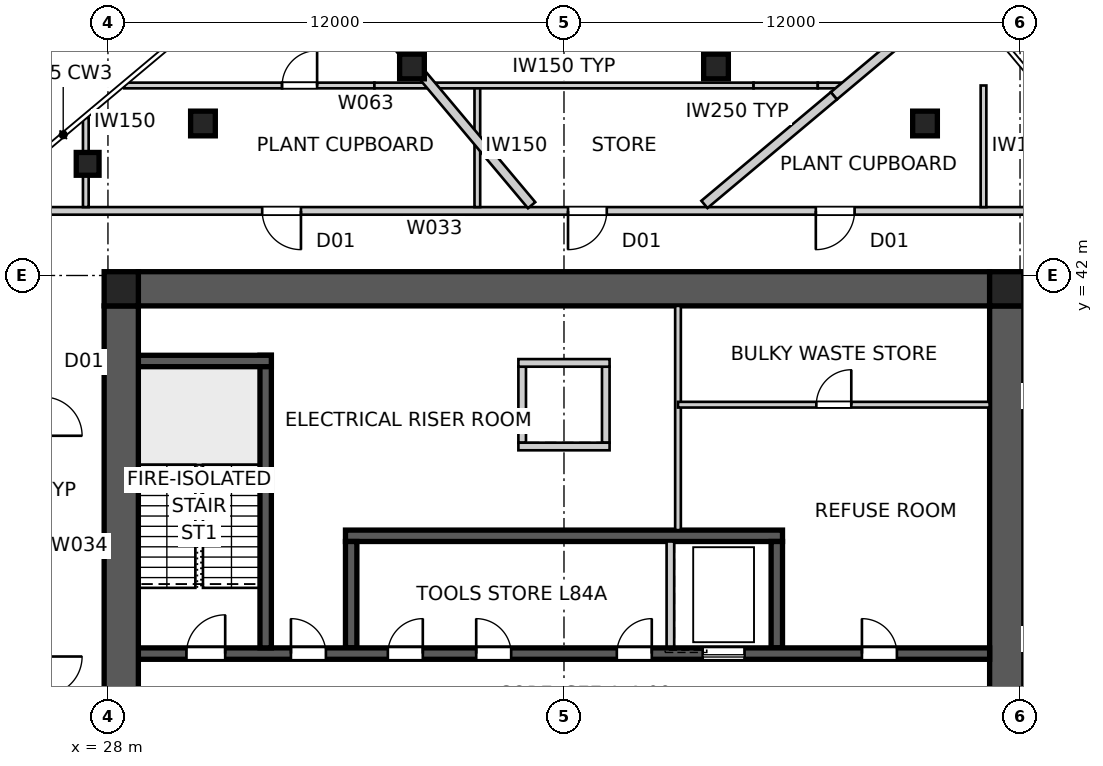
"""IFC4 building model, lengths in metres.
Left out: names, types, materials, properties, quantities, classifications, styles, units other than length and angle.
Written with IfcOpenShell. Run it as: python <this file> out.ifc"""

import sys

from ifc_helpers import new_model, si_unit, direction, frame, frame_2d, origin, origin_2d, place, context, subcontext, project, spatial, polyline, rectangle, outline, extrude, element, fill, save


model = new_model("IFC4")
c1 = context("Model", 3, precision=1e-05, world=origin(), true_north=direction((0.0, 1.0)))
c2 = subcontext(c1, "Body", "Model", "MODEL_VIEW")
j1 = project(units=[si_unit("LENGTHUNIT", "METRE"), si_unit("PLANEANGLEUNIT", "RADIAN")], contexts=[c1])
p1 = place(None, origin())
s1 = spatial("IfcSite", under=j1, at=p1, CompositionType="ELEMENT")
p2 = place(p1, origin())
s2 = spatial("IfcBuilding", under=s1, at=p2, CompositionType="ELEMENT")
p3 = place(p2, frame((0.0, 0.0, 304.3)))
s3 = spatial("IfcBuildingStorey", under=s2, at=p3, CompositionType="ELEMENT", Elevation=304.3)
p4 = place(p3, frame((28.8, 41.65, 0.0), z_axis=(0.0, 0.0, 1.0), x_axis=(1.0, 0.0, 0.0)))
e1 = element("IfcWall", 1, at=p4, inside=s3, PredefinedType="SHEAR", context=c2, shape_type="SweptSolid", body=[
    extrude(outline(polyline([(0.0, -0.45), (22.4, -0.45), (22.4, -0.025), (22.85, -0.025), (22.85, 0.025), (22.4, 0.025), (22.4, 0.45), (0.0, 0.45), (0.0, 0.025), (-0.45, 0.025), (-0.45, -0.025), (0.0, -0.025), (0.0, -0.45)])), origin(), (0.0, 0.0, 1.0), 4.5),
])
p5 = place(p3, frame((51.65, 18.8, 0.0), z_axis=(0.0, 0.0, 1.0), x_axis=(0.0, 1.0, 0.0)))
e2 = element("IfcWall", 2, at=p5, inside=s3, PredefinedType="SHEAR", context=c2, shape_type="SweptSolid", body=[
    extrude(outline(polyline([(0.0, -0.45), (22.4, -0.45), (22.4, -0.025), (22.85, -0.025), (22.85, 0.025), (22.4, 0.025), (22.4, 0.45), (0.0, 0.45), (0.0, 0.025), (-0.45, 0.025), (-0.45, -0.025), (0.0, -0.025), (0.0, -0.45)])), origin(), (0.0, 0.0, 1.0), 4.5),
])
p6 = place(p5, frame((11.14, 0.0, 0.0)))
e3 = element("IfcOpeningElement", 3, at=p6, cuts=e2, PredefinedType="OPENING", context=c2, shape_type="SweptSolid", body=[
    extrude(rectangle(XDim=1.02, YDim=2.4, at=frame_2d((0.51, 1.2))), frame((0.0, 0.46, 0.0), z_axis=(0.0, -1.0, 0.0), x_axis=(1.0, 0.0, 0.0)), (0.0, 0.0, 1.0), 0.92),
])
p7 = place(p3, frame((28.35, 41.2, 0.0), z_axis=(0.0, 0.0, 1.0), x_axis=(0.0, -1.0, 0.0)))
e4 = element("IfcWall", 4, at=p7, inside=s3, PredefinedType="SHEAR", context=c2, shape_type="SweptSolid", body=[
    extrude(outline(polyline([(0.0, -0.45), (22.4, -0.45), (22.4, -0.025), (22.85, -0.025), (22.85, 0.025), (22.4, 0.025), (22.4, 0.45), (0.0, 0.45), (0.0, 0.025), (-0.45, 0.025), (-0.45, -0.025), (0.0, -0.025), (0.0, -0.45)])), origin(), (0.0, 0.0, 1.0), 4.5),
])
p8 = place(p7, frame((11.14, 0.0, 0.0)))
e5 = element("IfcOpeningElement", 5, at=p8, cuts=e4, PredefinedType="OPENING", context=c2, shape_type="SweptSolid", body=[
    extrude(rectangle(XDim=1.02, YDim=2.4, at=frame_2d((0.51, 1.2))), frame((0.0, 0.46, 0.0), z_axis=(0.0, -1.0, 0.0), x_axis=(1.0, 0.0, 0.0)), (0.0, 0.0, 1.0), 0.92),
])
p9 = place(p3, frame((28.8, 32.05, 0.0), z_axis=(0.0, 0.0, 1.0), x_axis=(1.0, 0.0, 0.0)))
e6 = element("IfcWall", 6, at=p9, inside=s3, PredefinedType="SHEAR", context=c2, shape_type="SweptSolid", body=[
    extrude(rectangle(XDim=22.4, YDim=0.3, at=frame_2d((11.2, 0.0))), origin(), (0.0, 0.0, 1.0), 4.5),
])
p10 = place(p9, frame((19.04, 0.0, 0.0)))
e7 = element("IfcOpeningElement", 7, at=p10, cuts=e6, PredefinedType="OPENING", context=c2, shape_type="SweptSolid", body=[
    extrude(rectangle(XDim=0.92, YDim=2.1, at=frame_2d((0.46, 1.05))), frame((0.0, 0.16, 0.0), z_axis=(0.0, -1.0, 0.0), x_axis=(1.0, 0.0, 0.0)), (0.0, 0.0, 1.0), 0.32),
])
p11 = place(p9, frame((1.265, 0.0, 0.0)))
e8 = element("IfcOpeningElement", 8, at=p11, cuts=e6, PredefinedType="OPENING", context=c2, shape_type="SweptSolid", body=[
    extrude(rectangle(XDim=1.02, YDim=2.1, at=frame_2d((0.51, 1.05))), frame((0.0, 0.16, 0.0), z_axis=(0.0, -1.0, 0.0), x_axis=(1.0, 0.0, 0.0)), (0.0, 0.0, 1.0), 0.32),
])
p12 = place(p9, frame((4.015, 0.0, 0.0)))
e9 = element("IfcOpeningElement", 9, at=p12, cuts=e6, PredefinedType="OPENING", context=c2, shape_type="SweptSolid", body=[
    extrude(rectangle(XDim=0.92, YDim=2.1, at=frame_2d((0.46, 1.05))), frame((0.0, 0.16, 0.0), z_axis=(0.0, -1.0, 0.0), x_axis=(1.0, 0.0, 0.0)), (0.0, 0.0, 1.0), 0.32),
])
p13 = place(p9, frame((6.565, 0.0, 0.0)))
e10 = element("IfcOpeningElement", 10, at=p13, cuts=e6, PredefinedType="OPENING", context=c2, shape_type="SweptSolid", body=[
    extrude(rectangle(XDim=0.92, YDim=2.1, at=frame_2d((0.46, 1.05))), frame((0.0, 0.16, 0.0), z_axis=(0.0, -1.0, 0.0), x_axis=(1.0, 0.0, 0.0)), (0.0, 0.0, 1.0), 0.32),
])
p14 = place(p9, frame((8.89, 0.0, 0.0)))
e11 = element("IfcOpeningElement", 11, at=p14, cuts=e6, PredefinedType="OPENING", context=c2, shape_type="SweptSolid", body=[
    extrude(rectangle(XDim=0.92, YDim=2.1, at=frame_2d((0.46, 1.05))), frame((0.0, 0.16, 0.0), z_axis=(0.0, -1.0, 0.0), x_axis=(1.0, 0.0, 0.0)), (0.0, 0.0, 1.0), 0.32),
])
p15 = place(p9, frame((12.59, 0.0, 0.0)))
e12 = element("IfcOpeningElement", 12, at=p15, cuts=e6, PredefinedType="OPENING", context=c2, shape_type="SweptSolid", body=[
    extrude(rectangle(XDim=0.92, YDim=2.1, at=frame_2d((0.46, 1.05))), frame((0.0, 0.16, 0.0), z_axis=(0.0, -1.0, 0.0), x_axis=(1.0, 0.0, 0.0)), (0.0, 0.0, 1.0), 0.32),
])
p16 = place(p9, frame((14.85, 0.0, 0.0)))
e13 = element("IfcOpeningElement", 13, at=p16, cuts=e6, PredefinedType="OPENING", context=c2, shape_type="SweptSolid", body=[
    extrude(rectangle(XDim=1.1, YDim=2.1, at=frame_2d((0.55, 1.05))), frame((0.0, 0.16, 0.0), z_axis=(0.0, -1.0, 0.0), x_axis=(1.0, 0.0, 0.0)), (0.0, 0.0, 1.0), 0.32),
])
p17 = place(p3, frame((34.25, 35.15, 0.0), z_axis=(0.0, 0.0, 1.0), x_axis=(1.0, 0.0, 0.0)))
e14 = element("IfcWall", 14, at=p17, inside=s3, PredefinedType="SHEAR", context=c2, shape_type="SweptSolid", body=[
    extrude(rectangle(XDim=11.5, YDim=0.3, at=frame_2d((5.75, 0.0))), origin(), (0.0, 0.0, 1.0), 4.5),
])
p18 = place(p3, frame((34.4, 32.2, 0.0), z_axis=(0.0, 0.0, 1.0), x_axis=(0.0, 1.0, 0.0)))
e15 = element("IfcWall", 15, at=p18, inside=s3, PredefinedType="SHEAR", context=c2, shape_type="SweptSolid", body=[
    extrude(rectangle(XDim=2.8, YDim=0.3, at=frame_2d((1.4, 0.0))), origin(), (0.0, 0.0, 1.0), 4.5),
])
p19 = place(p3, frame((42.8, 32.2, 0.0), z_axis=(0.0, 0.0, 1.0), x_axis=(0.0, 1.0, 0.0)))
e16 = element("IfcWall", 16, at=p19, inside=s3, PredefinedType="SOLIDWALL", context=c2, shape_type="SweptSolid", body=[
    extrude(rectangle(XDim=2.8, YDim=0.2, at=frame_2d((1.4, 0.0))), origin(), (0.0, 0.0, 1.0), 4.5),
])
p20 = place(p3, frame((45.6, 32.2, 0.0), z_axis=(0.0, 0.0, 1.0), x_axis=(0.0, 1.0, 0.0)))
e17 = element("IfcWall", 17, at=p20, inside=s3, PredefinedType="SHEAR", context=c2, shape_type="SweptSolid", body=[
    extrude(rectangle(XDim=2.8, YDim=0.3, at=frame_2d((1.4, 0.0))), origin(), (0.0, 0.0, 1.0), 4.5),
])
p21 = place(p3, frame((32.15, 32.2, 0.0), z_axis=(0.0, 0.0, 1.0), x_axis=(0.0, 1.0, 0.0)))
e18 = element("IfcWall", 18, at=p21, inside=s3, PredefinedType="SHEAR", context=c2, shape_type="SweptSolid", body=[
    extrude(rectangle(XDim=7.7, YDim=0.3, at=frame_2d((3.85, 0.0))), origin(), (0.0, 0.0, 1.0), 4.5),
])
p22 = place(p3, frame((28.8, 39.75, 0.0), z_axis=(0.0, 0.0, 1.0), x_axis=(1.0, 0.0, 0.0)))
e19 = element("IfcWall", 19, at=p22, inside=s3, PredefinedType="SHEAR", context=c2, shape_type="SweptSolid", body=[
    extrude(rectangle(XDim=3.5, YDim=0.3, at=frame_2d((1.75, 0.0))), origin(), (0.0, 0.0, 1.0), 4.5),
])
for number, where, z_axis, x_axis in (
    (20, (38.9, 37.6, 0.0), (0.0, 0.0, 1.0), (0.0, 1.0, 0.0)),
    (21, (41.1, 37.6, 0.0), (0.0, 0.0, 1.0), (0.0, 1.0, 0.0)),
):
    element("IfcWall", number, at=place(p3, frame(where, z_axis=z_axis, x_axis=x_axis)), inside=s3, PredefinedType="SOLIDWALL", context=c2, shape_type="SweptSolid", body=[
        extrude(rectangle(XDim=2.0, YDim=0.2, at=frame_2d((1.0, 0.0))), origin(), (0.0, 0.0, 1.0), 4.5),
    ])
for number, where, z_axis, x_axis in (
    (22, (38.8, 37.5, 0.0), (0.0, 0.0, 1.0), (1.0, 0.0, 0.0)),
    (23, (38.8, 39.7, 0.0), (0.0, 0.0, 1.0), (1.0, 0.0, 0.0)),
):
    element("IfcWall", number, at=place(p3, frame(where, z_axis=z_axis, x_axis=x_axis)), inside=s3, PredefinedType="SOLIDWALL", context=c2, shape_type="SweptSolid", body=[
        extrude(rectangle(XDim=2.4, YDim=0.2, at=frame_2d((1.2, 0.0))), origin(), (0.0, 0.0, 1.0), 4.5),
    ])
for number, where, z_axis, x_axis in (
    (24, (51.65, 41.65, 0.0), (0.0, 0.0, 1.0), (1.0, 0.0, 0.0)),
    (25, (28.35, 41.65, 0.0), (0.0, 0.0, 1.0), (1.0, 0.0, 0.0)),
):
    element("IfcColumn", number, at=place(p3, frame(where, z_axis=z_axis, x_axis=x_axis)), inside=s3, PredefinedType="COLUMN", context=c2, shape_type="SweptSolid", body=[
        extrude(rectangle(XDim=0.9, YDim=0.9, at=origin_2d()), origin(), (0.0, 0.0, 1.0), 4.5),
    ])
p23 = place(p3, frame((27.466, 44.938, 0.0), z_axis=(0.0, 0.0, 1.0), x_axis=(1.0, 0.0, 0.0)))
e26 = element("IfcColumn", 26, at=p23, inside=s3, PredefinedType="COLUMN", context=c2, shape_type="SweptSolid", body=[
    extrude(rectangle(XDim=0.6, YDim=0.6, at=origin_2d()), origin(), (0.0, 0.0, 1.0), 4.5),
])
for number, where, z_axis, x_axis in (
    (27, (49.5, 46.0, 0.0), (0.0, 0.0, 1.0), (1.0, 0.0, 0.0)),
    (28, (44.0, 47.5, 0.0), (0.0, 0.0, 1.0), (1.0, 0.0, 0.0)),
    (29, (36.0, 47.5, 0.0), (0.0, 0.0, 1.0), (1.0, 0.0, 0.0)),
    (30, (30.5, 46.0, 0.0), (0.0, 0.0, 1.0), (1.0, 0.0, 0.0)),
):
    element("IfcColumn", number, at=place(p3, frame(where, z_axis=z_axis, x_axis=x_axis)), inside=s3, PredefinedType="COLUMN", context=c2, shape_type="SweptSolid", body=[
        extrude(rectangle(XDim=0.65, YDim=0.65, at=origin_2d()), origin(), (0.0, 0.0, 1.0), 4.5),
    ])
p24 = place(p3, frame((53.7, 43.7, 0.0), z_axis=(0.0, 0.0, 1.0), x_axis=(-1.0, 0.0, 0.0)))
e31 = element("IfcWall", 31, at=p24, inside=s3, PredefinedType="PARTITIONING", context=c2, shape_type="SweptSolid", body=[
    extrude(rectangle(XDim=27.4, YDim=0.2, at=frame_2d((13.7, 0.0))), origin(), (0.0, 0.0, 1.0), 4.25),
])
p25 = place(p24, frame((20.621, 0.0, 0.0)))
e32 = element("IfcOpeningElement", 32, at=p25, cuts=e31, PredefinedType="OPENING", context=c2, shape_type="SweptSolid", body=[
    extrude(rectangle(XDim=1.02, YDim=2.34, at=frame_2d((0.51, 1.17))), frame((0.0, 0.11, 0.0), z_axis=(0.0, -1.0, 0.0), x_axis=(1.0, 0.0, 0.0)), (0.0, 0.0, 1.0), 0.22),
])
p26 = place(p24, frame((6.053, 0.0, 0.0)))
e33 = element("IfcOpeningElement", 33, at=p26, cuts=e31, PredefinedType="OPENING", context=c2, shape_type="SweptSolid", body=[
    extrude(rectangle(XDim=1.02, YDim=2.34, at=frame_2d((0.51, 1.17))), frame((0.0, 0.11, 0.0), z_axis=(0.0, -1.0, 0.0), x_axis=(1.0, 0.0, 0.0)), (0.0, 0.0, 1.0), 0.22),
])
p27 = place(p24, frame((12.574, 0.0, 0.0)))
e34 = element("IfcOpeningElement", 34, at=p27, cuts=e31, PredefinedType="OPENING", context=c2, shape_type="SweptSolid", body=[
    extrude(rectangle(XDim=1.02, YDim=2.34, at=frame_2d((0.51, 1.17))), frame((0.0, 0.11, 0.0), z_axis=(0.0, -1.0, 0.0), x_axis=(1.0, 0.0, 0.0)), (0.0, 0.0, 1.0), 0.22),
])
p28 = place(p3, frame((49.635, 48.854, 0.0), z_axis=(0.0, 0.0, 1.0), x_axis=(-0.766014492995, -0.642823301165, 0.0)))
e35 = element("IfcWall", 35, at=p28, inside=s3, PredefinedType="PARTITIONING", context=c2, shape_type="SweptSolid", body=[
    extrude(rectangle(XDim=3.308, YDim=0.25, at=frame_2d((1.654, 0.0))), origin(), (0.0, 0.0, 1.0), 3.638),
])
p29 = place(p3, frame((47.101, 46.728, 0.0), z_axis=(0.0, 0.0, 1.0), x_axis=(-0.766051985436, -0.642778620996, 0.0)))
e36 = element("IfcWall", 36, at=p29, inside=s3, PredefinedType="PARTITIONING", context=c2, shape_type="SweptSolid", body=[
    extrude(rectangle(XDim=4.446, YDim=0.25, at=frame_2d((2.223, 0.0))), origin(), (0.0, 0.0, 1.0), 4.25),
])
p30 = place(p3, frame((33.143, 51.007, 0.0), z_axis=(0.0, 0.0, 1.0), x_axis=(0.64278692291, -0.766045019392, 0.0)))
e37 = element("IfcWall", 37, at=p30, inside=s3, PredefinedType="PARTITIONING", context=c2, shape_type="SweptSolid", body=[
    extrude(rectangle(XDim=9.343, YDim=0.25, at=frame_2d((4.671, 0.0))), origin(), (0.0, 0.0, 1.0), 4.25),
])
p31 = place(p3, frame((43.0, 41.2, 0.0), z_axis=(0.0, 0.0, 1.0), x_axis=(0.0, -1.0, 0.0)))
e38 = element("IfcWall", 38, at=p31, inside=s3, PredefinedType="SOLIDWALL", context=c2, shape_type="SweptSolid", body=[
    extrude(rectangle(XDim=5.9, YDim=0.15, at=frame_2d((2.95, 0.0))), origin(), (0.0, 0.0, 1.0), 4.25),
])
p32 = place(p3, frame((43.0, 38.6, 0.0), z_axis=(0.0, 0.0, 1.0), x_axis=(1.0, 0.0, 0.0)))
e39 = element("IfcWall", 39, at=p32, inside=s3, PredefinedType="SOLIDWALL", context=c2, shape_type="SweptSolid", body=[
    extrude(rectangle(XDim=8.2, YDim=0.15, at=frame_2d((4.1, 0.0))), origin(), (0.0, 0.0, 1.0), 4.25),
])
p33 = place(p32, frame((3.64, 0.0, 0.0)))
e40 = element("IfcOpeningElement", 40, at=p33, cuts=e39, PredefinedType="OPENING", context=c2, shape_type="SweptSolid", body=[
    extrude(rectangle(XDim=0.92, YDim=2.1, at=frame_2d((0.46, 1.05))), frame((0.0, 0.085, 0.0), z_axis=(0.0, -1.0, 0.0), x_axis=(1.0, 0.0, 0.0)), (0.0, 0.0, 1.0), 0.17),
])
p34 = place(p3, frame((51.039, 43.8, 0.0), z_axis=(0.0, 0.0, 1.0), x_axis=(0.0, 1.0, 0.0)))
e41 = element("IfcWall", 41, at=p34, inside=s3, PredefinedType="SOLIDWALL", context=c2, shape_type="SweptSolid", body=[
    extrude(rectangle(XDim=3.2, YDim=0.15, at=frame_2d((1.6, 0.0))), origin(), (0.0, 0.0, 1.0), 4.25),
])
p35 = place(p3, frame((27.417, 46.15, 0.0), z_axis=(0.0, 0.0, 1.0), x_axis=(0.0, -1.0, 0.0)))
e42 = element("IfcWall", 42, at=p35, inside=s3, PredefinedType="SOLIDWALL", context=c2, shape_type="SweptSolid", body=[
    extrude(rectangle(XDim=2.35, YDim=0.15, at=frame_2d((1.175, 0.0))), origin(), (0.0, 0.0, 1.0), 4.25),
])
p36 = place(p3, frame((37.72, 47.0, 0.0), z_axis=(0.0, 0.0, 1.0), x_axis=(0.0, -1.0, 0.0)))
e43 = element("IfcWall", 43, at=p36, inside=s3, PredefinedType="SOLIDWALL", context=c2, shape_type="SweptSolid", body=[
    extrude(rectangle(XDim=3.2, YDim=0.15, at=frame_2d((1.6, 0.0))), origin(), (0.0, 0.0, 1.0), 4.25),
])
p37 = place(p3, frame((28.43, 47.0, 0.0), z_axis=(0.0, 0.0, 1.0), x_axis=(1.0, 0.0, 0.0)))
e44 = element("IfcWall", 44, at=p37, inside=s3, PredefinedType="SOLIDWALL", context=c2, shape_type="SweptSolid", body=[
    extrude(rectangle(XDim=4.154, YDim=0.15, at=frame_2d((2.077, 0.0))), origin(), (0.0, 0.0, 1.0), 4.25),
])
p38 = place(p3, frame((32.584, 47.0, 0.0), z_axis=(0.0, 0.0, 1.0), x_axis=(1.0, 0.0, 0.0)))
e45 = element("IfcWall", 45, at=p38, inside=s3, PredefinedType="SOLIDWALL", context=c2, shape_type="SweptSolid", body=[
    extrude(rectangle(XDim=2.428, YDim=0.15, at=frame_2d((1.214, 0.0))), origin(), (0.0, 0.0, 1.0), 3.25),
])
p39 = place(p38, origin())
e46 = element("IfcOpeningElement", 46, at=p39, cuts=e45, PredefinedType="OPENING", context=c2, shape_type="SweptSolid", body=[
    extrude(rectangle(XDim=0.92, YDim=2.1, at=frame_2d((0.46, 1.05))), frame((0.0, 0.085, 0.0), z_axis=(0.0, -1.0, 0.0), x_axis=(1.0, 0.0, 0.0)), (0.0, 0.0, 1.0), 0.17),
])
p40 = place(p3, frame((35.012, 47.0, 0.0), z_axis=(0.0, 0.0, 1.0), x_axis=(1.0, 0.0, 0.0)))
e47 = element("IfcWall", 47, at=p40, inside=s3, PredefinedType="SOLIDWALL", context=c2, shape_type="SweptSolid", body=[
    extrude(rectangle(XDim=9.977, YDim=0.15, at=frame_2d((4.988, 0.0))), origin(), (0.0, 0.0, 1.0), 4.25),
])
p41 = place(p3, frame((44.988, 47.0, 0.0), z_axis=(0.0, 0.0, 1.0), x_axis=(1.0, 0.0, 0.0)))
e48 = element("IfcWall", 48, at=p41, inside=s3, PredefinedType="SOLIDWALL", context=c2, shape_type="SweptSolid", body=[
    extrude(rectangle(XDim=1.69, YDim=0.15, at=frame_2d((0.845, 0.0))), origin(), (0.0, 0.0, 1.0), 3.25),
])
p42 = place(p3, frame((46.678, 47.0, 0.0), z_axis=(0.0, 0.0, 1.0), x_axis=(1.0, 0.0, 0.0)))
e49 = element("IfcWall", 49, at=p42, inside=s3, PredefinedType="SOLIDWALL", context=c2, shape_type="SweptSolid", body=[
    extrude(rectangle(XDim=0.747, YDim=0.15, at=frame_2d((0.373, 0.0))), origin(), (0.0, 0.0, 1.0), 4.25),
])
p43 = place(p2, frame((0.0, 0.0, 308.8)))
p44 = place(p43, frame((0.0, 0.0, -0.25)))
p45 = place(p44, frame((50.5, 38.999, 0.0)))
p46 = place(p45, frame((0.0, 0.0, 0.2)))
e50 = element("IfcWindow", 50, at=p46, inside=s3, PartitioningType="SINGLE_PANEL", PredefinedType="SKYLIGHT", context=c2, shape_type="SweptSolid", body=[
    extrude(rectangle(XDim=1.2, YDim=1.2, at=origin_2d()), origin(), (0.0, 0.0, 1.0), 0.05),
])
p47 = place(p10, origin())
e51 = element("IfcDoor", 51, at=p47, inside=s3, OperationType="SINGLE_SWING_LEFT", PredefinedType="DOOR", context=c2, shape_type="SweptSolid", body=[
    extrude(rectangle(XDim=0.92, YDim=2.1, at=frame_2d((0.46, 1.05))), frame((0.0, 0.025, 0.0), z_axis=(0.0, -1.0, 0.0), x_axis=(1.0, 0.0, 0.0)), (0.0, 0.0, 1.0), 0.05),
])
fill(e7, e51)
p48 = place(p11, origin())
e52 = element("IfcDoor", 52, at=p48, inside=s3, OperationType="SINGLE_SWING_RIGHT", PredefinedType="DOOR", context=c2, shape_type="SweptSolid", body=[
    extrude(rectangle(XDim=1.02, YDim=2.1, at=frame_2d((0.51, 1.05))), frame((0.0, 0.025, 0.0), z_axis=(0.0, -1.0, 0.0), x_axis=(1.0, 0.0, 0.0)), (0.0, 0.0, 1.0), 0.05),
])
fill(e8, e52)
p49 = place(p12, origin())
e53 = element("IfcDoor", 53, at=p49, inside=s3, OperationType="SINGLE_SWING_LEFT", PredefinedType="DOOR", context=c2, shape_type="SweptSolid", body=[
    extrude(rectangle(XDim=0.92, YDim=2.1, at=frame_2d((0.46, 1.05))), frame((0.0, 0.025, 0.0), z_axis=(0.0, -1.0, 0.0), x_axis=(1.0, 0.0, 0.0)), (0.0, 0.0, 1.0), 0.05),
])
fill(e9, e53)
p50 = place(p25, origin())
e54 = element("IfcDoor", 54, at=p50, inside=s3, OperationType="SINGLE_SWING_LEFT", PredefinedType="DOOR", context=c2, shape_type="SweptSolid", body=[
    extrude(rectangle(XDim=1.02, YDim=2.34, at=frame_2d((0.51, 1.17))), frame((0.0, 0.025, 0.0), z_axis=(0.0, -1.0, 0.0), x_axis=(1.0, 0.0, 0.0)), (0.0, 0.0, 1.0), 0.05),
])
fill(e32, e54)
p51 = place(p26, origin())
e55 = element("IfcDoor", 55, at=p51, inside=s3, OperationType="SINGLE_SWING_RIGHT", PredefinedType="DOOR", context=c2, shape_type="SweptSolid", body=[
    extrude(rectangle(XDim=1.02, YDim=2.34, at=frame_2d((0.51, 1.17))), frame((0.0, 0.025, 0.0), z_axis=(0.0, -1.0, 0.0), x_axis=(1.0, 0.0, 0.0)), (0.0, 0.0, 1.0), 0.05),
])
fill(e33, e55)
p52 = place(p27, origin())
e56 = element("IfcDoor", 56, at=p52, inside=s3, OperationType="SINGLE_SWING_RIGHT", PredefinedType="DOOR", context=c2, shape_type="SweptSolid", body=[
    extrude(rectangle(XDim=1.02, YDim=2.34, at=frame_2d((0.51, 1.17))), frame((0.0, 0.025, 0.0), z_axis=(0.0, -1.0, 0.0), x_axis=(1.0, 0.0, 0.0)), (0.0, 0.0, 1.0), 0.05),
])
fill(e34, e56)
p53 = place(p33, origin())
e57 = element("IfcDoor", 57, at=p53, inside=s3, OperationType="SINGLE_SWING_RIGHT", PredefinedType="DOOR", context=c2, shape_type="SweptSolid", body=[
    extrude(rectangle(XDim=0.92, YDim=2.1, at=frame_2d((0.46, 1.05))), frame((0.0, 0.025, 0.0), z_axis=(0.0, -1.0, 0.0), x_axis=(1.0, 0.0, 0.0)), (0.0, 0.0, 1.0), 0.05),
])
fill(e40, e57)
p54 = place(p39, origin())
e58 = element("IfcDoor", 58, at=p54, inside=s3, OperationType="SINGLE_SWING_RIGHT", PredefinedType="DOOR", context=c2, shape_type="SweptSolid", body=[
    extrude(rectangle(XDim=0.92, YDim=2.1, at=frame_2d((0.46, 1.05))), frame((0.0, 0.025, 0.0), z_axis=(0.0, -1.0, 0.0), x_axis=(1.0, 0.0, 0.0)), (0.0, 0.0, 1.0), 0.05),
])
fill(e46, e58)
p55 = place(p13, origin())
e59 = element("IfcDoor", 59, at=p55, inside=s3, OperationType="SINGLE_SWING_RIGHT", PredefinedType="DOOR", context=c2, shape_type="SweptSolid", body=[
    extrude(rectangle(XDim=0.92, YDim=2.1, at=frame_2d((0.46, 1.05))), frame((0.0, 0.025, 0.0), z_axis=(0.0, -1.0, 0.0), x_axis=(1.0, 0.0, 0.0)), (0.0, 0.0, 1.0), 0.05),
])
fill(e10, e59)
p56 = place(p14, origin())
e60 = element("IfcDoor", 60, at=p56, inside=s3, OperationType="SINGLE_SWING_LEFT", PredefinedType="DOOR", context=c2, shape_type="SweptSolid", body=[
    extrude(rectangle(XDim=0.92, YDim=2.1, at=frame_2d((0.46, 1.05))), frame((0.0, 0.025, 0.0), z_axis=(0.0, -1.0, 0.0), x_axis=(1.0, 0.0, 0.0)), (0.0, 0.0, 1.0), 0.05),
])
fill(e11, e60)
p57 = place(p15, origin())
e61 = element("IfcDoor", 61, at=p57, inside=s3, OperationType="SINGLE_SWING_RIGHT", PredefinedType="DOOR", context=c2, shape_type="SweptSolid", body=[
    extrude(rectangle(XDim=0.92, YDim=2.1, at=frame_2d((0.46, 1.05))), frame((0.0, 0.025, 0.0), z_axis=(0.0, -1.0, 0.0), x_axis=(1.0, 0.0, 0.0)), (0.0, 0.0, 1.0), 0.05),
])
fill(e12, e61)
p58 = place(p16, origin())
e62 = element("IfcDoor", 62, at=p58, inside=s3, OperationType="SLIDING_TO_LEFT", PredefinedType="DOOR", context=c2, shape_type="SweptSolid", body=[
    extrude(rectangle(XDim=1.1, YDim=2.1, at=frame_2d((0.55, 1.05))), frame((0.0, 0.025, 0.0), z_axis=(0.0, -1.0, 0.0), x_axis=(1.0, 0.0, 0.0)), (0.0, 0.0, 1.0), 0.05),
])
fill(e13, e62)
save(model, sys.argv[1])
